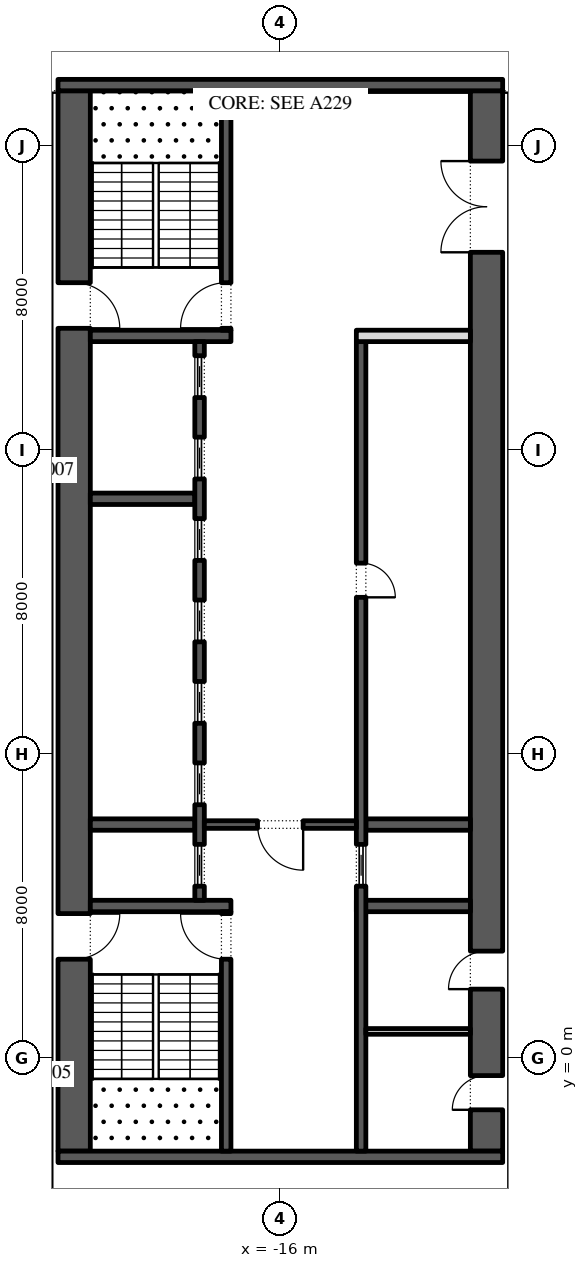
"""IFC4 building model, lengths in metres.
Left out: names, types, materials, properties, quantities, classifications, styles, units other than length and angle.
Written with IfcOpenShell. Run it as: python <this file> out.ifc"""

import sys

from ifc_helpers import new_model, si_unit, direction, frame, frame_2d, origin, place, context, subcontext, project, spatial, rectangle, extrude, element, fill, save


model = new_model("IFC4")
c1 = context("Model", 3, precision=1e-05, world=origin(), true_north=direction((0.0, 1.0)))
c2 = subcontext(c1, "Body", "Model", "MODEL_VIEW")
j1 = project(units=[si_unit("LENGTHUNIT", "METRE"), si_unit("PLANEANGLEUNIT", "RADIAN")], contexts=[c1])
p1 = place(None, origin())
s1 = spatial("IfcSite", under=j1, at=p1, CompositionType="ELEMENT")
p2 = place(p1, origin())
s2 = spatial("IfcBuilding", under=s1, at=p2, CompositionType="ELEMENT")
p3 = place(p2, frame((0.0, 0.0, 122.4)))
s3 = spatial("IfcBuildingStorey", under=s2, at=p3, CompositionType="ELEMENT", Elevation=122.4)
p4 = place(p3, frame((-21.425, -2.45, 0.0), z_axis=(0.0, 0.0, 1.0), x_axis=(0.0, 1.0, 0.0)))
e1 = element("IfcWall", 1, at=p4, inside=s3, PredefinedType="SHEAR", context=c2, shape_type="SweptSolid", body=[
    extrude(rectangle(XDim=27.9, YDim=0.85, at=frame_2d((13.95, 0.0))), origin(), (0.0, 0.0, 1.0), 4.0),
])
p5 = place(p4, frame((5.05, 0.0, 0.0)))
e2 = element("IfcOpeningElement", 2, at=p5, cuts=e1, PredefinedType="OPENING", context=c2, shape_type="SweptSolid", body=[
    extrude(rectangle(XDim=1.2, YDim=2.1, at=frame_2d((0.6, 1.05))), frame((0.0, 0.435, 0.0), z_axis=(0.0, -1.0, 0.0), x_axis=(1.0, 0.0, 0.0)), (0.0, 0.0, 1.0), 0.87),
])
p6 = place(p4, frame((21.65, 0.0, 0.0)))
e3 = element("IfcOpeningElement", 3, at=p6, cuts=e1, PredefinedType="OPENING", context=c2, shape_type="SweptSolid", body=[
    extrude(rectangle(XDim=1.2, YDim=2.1, at=frame_2d((0.6, 1.05))), frame((0.0, 0.435, 0.0), z_axis=(0.0, -1.0, 0.0), x_axis=(1.0, 0.0, 0.0)), (0.0, 0.0, 1.0), 0.87),
])
p7 = place(p3, frame((-10.575, -2.45, 0.0), z_axis=(0.0, 0.0, 1.0), x_axis=(0.0, 1.0, 0.0)))
e4 = element("IfcWall", 4, at=p7, inside=s3, PredefinedType="SHEAR", context=c2, shape_type="SweptSolid", body=[
    extrude(rectangle(XDim=27.9, YDim=0.85, at=frame_2d((13.95, 0.0))), origin(), (0.0, 0.0, 1.0), 4.0),
])
p8 = place(p7, frame((23.65, 0.0, 0.0)))
e5 = element("IfcOpeningElement", 5, at=p8, cuts=e4, PredefinedType="OPENING", context=c2, shape_type="SweptSolid", body=[
    extrude(rectangle(XDim=2.4, YDim=2.1, at=frame_2d((1.2, 1.05))), frame((0.0, 0.435, 0.0), z_axis=(0.0, -1.0, 0.0), x_axis=(1.0, 0.0, 0.0)), (0.0, 0.0, 1.0), 0.87),
])
p9 = place(p7, frame((1.087, 0.0, 0.0)))
e6 = element("IfcOpeningElement", 6, at=p9, cuts=e4, PredefinedType="OPENING", context=c2, shape_type="SweptSolid", body=[
    extrude(rectangle(XDim=0.9, YDim=2.1, at=frame_2d((0.45, 1.05))), frame((0.0, 0.435, 0.0), z_axis=(0.0, -1.0, 0.0), x_axis=(1.0, 0.0, 0.0)), (0.0, 0.0, 1.0), 0.87),
])
p10 = place(p7, frame((4.262, 0.0, 0.0)))
e7 = element("IfcOpeningElement", 7, at=p10, cuts=e4, PredefinedType="OPENING", context=c2, shape_type="SweptSolid", body=[
    extrude(rectangle(XDim=1.0, YDim=2.1, at=frame_2d((0.5, 1.05))), frame((0.0, 0.435, 0.0), z_axis=(0.0, -1.0, 0.0), x_axis=(1.0, 0.0, 0.0)), (0.0, 0.0, 1.0), 0.87),
])
for number, where, z_axis, x_axis in (
    (8, (-21.85, -2.6, 0.0), (0.0, 0.0, 1.0), (1.0, 0.0, 0.0)),
    (9, (-21.85, 25.6, 0.0), (0.0, 0.0, 1.0), (1.0, 0.0, 0.0)),
):
    element("IfcWall", number, at=place(p3, frame(where, z_axis=z_axis, x_axis=x_axis)), inside=s3, PredefinedType="SHEAR", context=c2, shape_type="SweptSolid", body=[
        extrude(rectangle(XDim=11.7, YDim=0.3, at=frame_2d((5.85, 0.0))), origin(), (0.0, 0.0, 1.0), 4.0),
    ])
p11 = place(p3, frame((-21.0, 4.0, 0.0), z_axis=(0.0, 0.0, 1.0), x_axis=(1.0, 0.0, 0.0)))
e10 = element("IfcWall", 10, at=p11, inside=s3, PredefinedType="SHEAR", context=c2, shape_type="SweptSolid", body=[
    extrude(rectangle(XDim=3.7, YDim=0.3, at=frame_2d((1.85, 0.0))), origin(), (0.0, 0.0, 1.0), 4.0),
])
p12 = place(p3, frame((-17.425, -2.45, 0.0), z_axis=(0.0, 0.0, 1.0), x_axis=(0.0, 1.0, 0.0)))
e11 = element("IfcWall", 11, at=p12, inside=s3, PredefinedType="SHEAR", context=c2, shape_type="SweptSolid", body=[
    extrude(rectangle(XDim=6.3, YDim=0.25, at=frame_2d((3.15, 0.0))), origin(), (0.0, 0.0, 1.0), 4.0),
])
p13 = place(p12, frame((5.05, 0.0, 0.0)))
e12 = element("IfcOpeningElement", 12, at=p13, cuts=e11, PredefinedType="OPENING", context=c2, shape_type="SweptSolid", body=[
    extrude(rectangle(XDim=1.2, YDim=2.1, at=frame_2d((0.6, 1.05))), frame((0.0, 0.135, 0.0), z_axis=(0.0, -1.0, 0.0), x_axis=(1.0, 0.0, 0.0)), (0.0, 0.0, 1.0), 0.27),
])
p14 = place(p3, frame((-21.0, 19.0, 0.0), z_axis=(0.0, 0.0, 1.0), x_axis=(1.0, 0.0, 0.0)))
e13 = element("IfcWall", 13, at=p14, inside=s3, PredefinedType="SHEAR", context=c2, shape_type="SweptSolid", body=[
    extrude(rectangle(XDim=3.7, YDim=0.3, at=frame_2d((1.85, 0.0))), origin(), (0.0, 0.0, 1.0), 4.0),
])
p15 = place(p3, frame((-17.425, 19.15, 0.0), z_axis=(0.0, 0.0, 1.0), x_axis=(0.0, 1.0, 0.0)))
e14 = element("IfcWall", 14, at=p15, inside=s3, PredefinedType="SHEAR", context=c2, shape_type="SweptSolid", body=[
    extrude(rectangle(XDim=6.3, YDim=0.25, at=frame_2d((3.15, 0.0))), origin(), (0.0, 0.0, 1.0), 4.0),
])
p16 = place(p15, frame((0.05, 0.0, 0.0)))
e15 = element("IfcOpeningElement", 15, at=p16, cuts=e14, PredefinedType="OPENING", context=c2, shape_type="SweptSolid", body=[
    extrude(rectangle(XDim=1.2, YDim=2.1, at=frame_2d((0.6, 1.05))), frame((0.0, 0.135, 0.0), z_axis=(0.0, -1.0, 0.0), x_axis=(1.0, 0.0, 0.0)), (0.0, 0.0, 1.0), 0.27),
])
for number, where, z_axis, x_axis in (
    (16, (-21.0, 6.143, 0.0), (0.0, 0.0, 1.0), (1.0, 0.0, 0.0)),
    (17, (-21.0, 14.714, 0.0), (0.0, 0.0, 1.0), (1.0, 0.0, 0.0)),
):
    element("IfcWall", number, at=place(p3, frame(where, z_axis=z_axis, x_axis=x_axis)), inside=s3, PredefinedType="SHEAR", context=c2, shape_type="SweptSolid", body=[
        extrude(rectangle(XDim=2.75, YDim=0.3, at=frame_2d((1.375, 0.0))), origin(), (0.0, 0.0, 1.0), 4.0),
    ])
p17 = place(p3, frame((-18.125, 4.15, 0.0), z_axis=(0.0, 0.0, 1.0), x_axis=(0.0, 1.0, 0.0)))
e18 = element("IfcWall", 18, at=p17, inside=s3, PredefinedType="SHEAR", context=c2, shape_type="SweptSolid", body=[
    extrude(rectangle(XDim=14.7, YDim=0.25, at=frame_2d((7.35, 0.0))), origin(), (0.0, 0.0, 1.0), 4.0),
])
p18 = place(p17, frame((0.371, 0.0, 0.0)))
e19 = element("IfcOpeningElement", 19, at=p18, cuts=e18, PredefinedType="OPENING", context=c2, shape_type="SweptSolid", body=[
    extrude(rectangle(XDim=1.1, YDim=2.1, at=frame_2d((0.55, 1.05))), frame((0.0, 0.135, 0.0), z_axis=(0.0, -1.0, 0.0), x_axis=(1.0, 0.0, 0.0)), (0.0, 0.0, 1.0), 0.27),
])
p19 = place(p17, frame((2.514, 0.0, 0.0)))
e20 = element("IfcOpeningElement", 20, at=p19, cuts=e18, PredefinedType="OPENING", context=c2, shape_type="SweptSolid", body=[
    extrude(rectangle(XDim=1.1, YDim=2.1, at=frame_2d((0.55, 1.05))), frame((0.0, 0.135, 0.0), z_axis=(0.0, -1.0, 0.0), x_axis=(1.0, 0.0, 0.0)), (0.0, 0.0, 1.0), 0.27),
])
p20 = place(p17, frame((4.657, 0.0, 0.0)))
e21 = element("IfcOpeningElement", 21, at=p20, cuts=e18, PredefinedType="OPENING", context=c2, shape_type="SweptSolid", body=[
    extrude(rectangle(XDim=1.1, YDim=2.1, at=frame_2d((0.55, 1.05))), frame((0.0, 0.135, 0.0), z_axis=(0.0, -1.0, 0.0), x_axis=(1.0, 0.0, 0.0)), (0.0, 0.0, 1.0), 0.27),
])
p21 = place(p17, frame((6.8, 0.0, 0.0)))
e22 = element("IfcOpeningElement", 22, at=p21, cuts=e18, PredefinedType="OPENING", context=c2, shape_type="SweptSolid", body=[
    extrude(rectangle(XDim=1.1, YDim=2.1, at=frame_2d((0.55, 1.05))), frame((0.0, 0.135, 0.0), z_axis=(0.0, -1.0, 0.0), x_axis=(1.0, 0.0, 0.0)), (0.0, 0.0, 1.0), 0.27),
])
p22 = place(p17, frame((8.943, 0.0, 0.0)))
e23 = element("IfcOpeningElement", 23, at=p22, cuts=e18, PredefinedType="OPENING", context=c2, shape_type="SweptSolid", body=[
    extrude(rectangle(XDim=1.1, YDim=2.1, at=frame_2d((0.55, 1.05))), frame((0.0, 0.135, 0.0), z_axis=(0.0, -1.0, 0.0), x_axis=(1.0, 0.0, 0.0)), (0.0, 0.0, 1.0), 0.27),
])
p23 = place(p17, frame((11.086, 0.0, 0.0)))
e24 = element("IfcOpeningElement", 24, at=p23, cuts=e18, PredefinedType="OPENING", context=c2, shape_type="SweptSolid", body=[
    extrude(rectangle(XDim=1.1, YDim=2.1, at=frame_2d((0.55, 1.05))), frame((0.0, 0.135, 0.0), z_axis=(0.0, -1.0, 0.0), x_axis=(1.0, 0.0, 0.0)), (0.0, 0.0, 1.0), 0.27),
])
p24 = place(p17, frame((13.229, 0.0, 0.0)))
e25 = element("IfcOpeningElement", 25, at=p24, cuts=e18, PredefinedType="OPENING", context=c2, shape_type="SweptSolid", body=[
    extrude(rectangle(XDim=1.1, YDim=2.1, at=frame_2d((0.55, 1.05))), frame((0.0, 0.135, 0.0), z_axis=(0.0, -1.0, 0.0), x_axis=(1.0, 0.0, 0.0)), (0.0, 0.0, 1.0), 0.27),
])
p25 = place(p3, frame((-14.0, 4.0, 0.0), z_axis=(0.0, 0.0, 1.0), x_axis=(1.0, 0.0, 0.0)))
e26 = element("IfcWall", 26, at=p25, inside=s3, PredefinedType="SHEAR", context=c2, shape_type="SweptSolid", body=[
    extrude(rectangle(XDim=3.0, YDim=0.3, at=frame_2d((1.5, 0.0))), origin(), (0.0, 0.0, 1.0), 4.0),
])
p26 = place(p3, frame((-13.75, 6.143, 0.0), z_axis=(0.0, 0.0, 1.0), x_axis=(1.0, 0.0, 0.0)))
e27 = element("IfcWall", 27, at=p26, inside=s3, PredefinedType="SHEAR", context=c2, shape_type="SweptSolid", body=[
    extrude(rectangle(XDim=2.75, YDim=0.3, at=frame_2d((1.375, 0.0))), origin(), (0.0, 0.0, 1.0), 4.0),
])
p27 = place(p3, frame((-13.875, -2.45, 0.0), z_axis=(0.0, 0.0, 1.0), x_axis=(0.0, 1.0, 0.0)))
e28 = element("IfcWall", 28, at=p27, inside=s3, PredefinedType="SHEAR", context=c2, shape_type="SweptSolid", body=[
    extrude(rectangle(XDim=21.3, YDim=0.25, at=frame_2d((10.65, 0.0))), origin(), (0.0, 0.0, 1.0), 4.0),
])
p28 = place(p27, frame((14.571, 0.0, 0.0)))
e29 = element("IfcOpeningElement", 29, at=p28, cuts=e28, PredefinedType="OPENING", context=c2, shape_type="SweptSolid", body=[
    extrude(rectangle(XDim=0.9, YDim=2.1, at=frame_2d((0.45, 1.05))), frame((0.0, 0.135, 0.0), z_axis=(0.0, -1.0, 0.0), x_axis=(1.0, 0.0, 0.0)), (0.0, 0.0, 1.0), 0.27),
])
p29 = place(p27, frame((6.971, 0.0, 0.0)))
e30 = element("IfcOpeningElement", 30, at=p29, cuts=e28, PredefinedType="OPENING", context=c2, shape_type="SweptSolid", body=[
    extrude(rectangle(XDim=1.1, YDim=2.1, at=frame_2d((0.55, 1.05))), frame((0.0, 0.135, 0.0), z_axis=(0.0, -1.0, 0.0), x_axis=(1.0, 0.0, 0.0)), (0.0, 0.0, 1.0), 0.27),
])
p30 = place(p3, frame((-14.0, 19.0, 0.0), z_axis=(0.0, 0.0, 1.0), x_axis=(1.0, 0.0, 0.0)))
e31 = element("IfcWall", 31, at=p30, inside=s3, PredefinedType="PARTITIONING", context=c2, shape_type="SweptSolid", body=[
    extrude(rectangle(XDim=3.0, YDim=0.3, at=frame_2d((1.5, 0.0))), origin(), (0.0, 0.0, 1.0), 4.0),
])
p31 = place(p3, frame((-18.0, 6.143, 0.0), z_axis=(0.0, 0.0, 1.0), x_axis=(1.0, 0.0, 0.0)))
e32 = element("IfcWall", 32, at=p31, inside=s3, PredefinedType="SHEAR", context=c2, shape_type="SweptSolid", body=[
    extrude(rectangle(XDim=4.0, YDim=0.2, at=frame_2d((2.0, 0.0))), origin(), (0.0, 0.0, 1.0), 4.0),
])
p32 = place(p31, frame((1.4, 0.0, 0.0)))
e33 = element("IfcOpeningElement", 33, at=p32, cuts=e32, PredefinedType="OPENING", context=c2, shape_type="SweptSolid", body=[
    extrude(rectangle(XDim=1.2, YDim=2.1, at=frame_2d((0.6, 1.05))), frame((0.0, 0.11, 0.0), z_axis=(0.0, -1.0, 0.0), x_axis=(1.0, 0.0, 0.0)), (0.0, 0.0, 1.0), 0.22),
])
p33 = place(p3, frame((-13.75, 0.7, 0.0), z_axis=(0.0, 0.0, 1.0), x_axis=(1.0, 0.0, 0.0)))
e34 = element("IfcWall", 34, at=p33, inside=s3, PredefinedType="PARTITIONING", context=c2, shape_type="SweptSolid", body=[
    extrude(rectangle(XDim=2.75, YDim=0.15, at=frame_2d((1.375, 0.0))), origin(), (0.0, 0.0, 1.0), 4.0),
])
p34 = place(p18, origin())
e35 = element("IfcDoor", 35, at=p34, inside=s3, OperationType="SLIDING_TO_LEFT", PredefinedType="DOOR", context=c2, shape_type="SweptSolid", body=[
    extrude(rectangle(XDim=1.1, YDim=2.1, at=frame_2d((0.55, 1.05))), frame((0.0, 0.025, 0.0), z_axis=(0.0, -1.0, 0.0), x_axis=(1.0, 0.0, 0.0)), (0.0, 0.0, 1.0), 0.05),
])
fill(e19, e35)
p35 = place(p19, origin())
e36 = element("IfcDoor", 36, at=p35, inside=s3, OperationType="SLIDING_TO_LEFT", PredefinedType="DOOR", context=c2, shape_type="SweptSolid", body=[
    extrude(rectangle(XDim=1.1, YDim=2.1, at=frame_2d((0.55, 1.05))), frame((0.0, 0.025, 0.0), z_axis=(0.0, -1.0, 0.0), x_axis=(1.0, 0.0, 0.0)), (0.0, 0.0, 1.0), 0.05),
])
fill(e20, e36)
p36 = place(p20, origin())
e37 = element("IfcDoor", 37, at=p36, inside=s3, OperationType="SLIDING_TO_LEFT", PredefinedType="DOOR", context=c2, shape_type="SweptSolid", body=[
    extrude(rectangle(XDim=1.1, YDim=2.1, at=frame_2d((0.55, 1.05))), frame((0.0, 0.025, 0.0), z_axis=(0.0, -1.0, 0.0), x_axis=(1.0, 0.0, 0.0)), (0.0, 0.0, 1.0), 0.05),
])
fill(e21, e37)
p37 = place(p21, origin())
e38 = element("IfcDoor", 38, at=p37, inside=s3, OperationType="SLIDING_TO_LEFT", PredefinedType="DOOR", context=c2, shape_type="SweptSolid", body=[
    extrude(rectangle(XDim=1.1, YDim=2.1, at=frame_2d((0.55, 1.05))), frame((0.0, 0.025, 0.0), z_axis=(0.0, -1.0, 0.0), x_axis=(1.0, 0.0, 0.0)), (0.0, 0.0, 1.0), 0.05),
])
fill(e22, e38)
p38 = place(p22, origin())
e39 = element("IfcDoor", 39, at=p38, inside=s3, OperationType="SLIDING_TO_LEFT", PredefinedType="DOOR", context=c2, shape_type="SweptSolid", body=[
    extrude(rectangle(XDim=1.1, YDim=2.1, at=frame_2d((0.55, 1.05))), frame((0.0, 0.025, 0.0), z_axis=(0.0, -1.0, 0.0), x_axis=(1.0, 0.0, 0.0)), (0.0, 0.0, 1.0), 0.05),
])
fill(e23, e39)
p39 = place(p23, origin())
e40 = element("IfcDoor", 40, at=p39, inside=s3, OperationType="SLIDING_TO_LEFT", PredefinedType="DOOR", context=c2, shape_type="SweptSolid", body=[
    extrude(rectangle(XDim=1.1, YDim=2.1, at=frame_2d((0.55, 1.05))), frame((0.0, 0.025, 0.0), z_axis=(0.0, -1.0, 0.0), x_axis=(1.0, 0.0, 0.0)), (0.0, 0.0, 1.0), 0.05),
])
fill(e24, e40)
p40 = place(p24, origin())
e41 = element("IfcDoor", 41, at=p40, inside=s3, OperationType="SLIDING_TO_LEFT", PredefinedType="DOOR", context=c2, shape_type="SweptSolid", body=[
    extrude(rectangle(XDim=1.1, YDim=2.1, at=frame_2d((0.55, 1.05))), frame((0.0, 0.025, 0.0), z_axis=(0.0, -1.0, 0.0), x_axis=(1.0, 0.0, 0.0)), (0.0, 0.0, 1.0), 0.05),
])
fill(e25, e41)
p41 = place(p28, frame((0.9, -0.2, 0.0), z_axis=(0.0, 0.0, 1.0), x_axis=(-1.0, 0.0, 0.0)))
e42 = element("IfcDoor", 42, at=p41, inside=s3, OperationType="SINGLE_SWING_LEFT", PredefinedType="DOOR", context=c2, shape_type="SweptSolid", body=[
    extrude(rectangle(XDim=0.9, YDim=2.1, at=frame_2d((0.45, 1.05))), frame((0.0, -0.075, 0.0), z_axis=(0.0, -1.0, 0.0), x_axis=(1.0, 0.0, 0.0)), (0.0, 0.0, 1.0), 0.05),
])
fill(e29, e42)
p42 = place(p29, origin())
e43 = element("IfcDoor", 43, at=p42, inside=s3, OperationType="SLIDING_TO_LEFT", PredefinedType="DOOR", context=c2, shape_type="SweptSolid", body=[
    extrude(rectangle(XDim=1.1, YDim=2.1, at=frame_2d((0.55, 1.05))), frame((0.0, 0.025, 0.0), z_axis=(0.0, -1.0, 0.0), x_axis=(1.0, 0.0, 0.0)), (0.0, 0.0, 1.0), 0.05),
])
fill(e30, e43)
p43 = place(p32, frame((1.2, 0.0, 0.0), z_axis=(0.0, 0.0, 1.0), x_axis=(-1.0, 0.0, 0.0)))
e44 = element("IfcDoor", 44, at=p43, inside=s3, OperationType="SINGLE_SWING_RIGHT", PredefinedType="DOOR", context=c2, shape_type="SweptSolid", body=[
    extrude(rectangle(XDim=1.2, YDim=2.1, at=frame_2d((0.6, 1.05))), frame((0.0, 0.025, 0.0), z_axis=(0.0, -1.0, 0.0), x_axis=(1.0, 0.0, 0.0)), (0.0, 0.0, 1.0), 0.05),
])
fill(e33, e44)
p44 = place(p8, origin())
e45 = element("IfcDoor", 45, at=p44, inside=s3, OperationType="DOUBLE_DOOR_SINGLE_SWING", PredefinedType="DOOR", context=c2, shape_type="SweptSolid", body=[
    extrude(rectangle(XDim=2.4, YDim=2.1, at=frame_2d((1.2, 1.05))), frame((0.0, 0.025, 0.0), z_axis=(0.0, -1.0, 0.0), x_axis=(1.0, 0.0, 0.0)), (0.0, 0.0, 1.0), 0.05),
])
fill(e5, e45)
p45 = place(p13, origin())
e46 = element("IfcDoor", 46, at=p45, inside=s3, OperationType="SINGLE_SWING_LEFT", PredefinedType="DOOR", context=c2, shape_type="SweptSolid", body=[
    extrude(rectangle(XDim=1.2, YDim=2.1, at=frame_2d((0.6, 1.05))), frame((0.0, 0.025, 0.0), z_axis=(0.0, -1.0, 0.0), x_axis=(1.0, 0.0, 0.0)), (0.0, 0.0, 1.0), 0.05),
])
fill(e12, e46)
p46 = place(p5, frame((1.2, 0.0, 0.0), z_axis=(0.0, 0.0, 1.0), x_axis=(-1.0, 0.0, 0.0)))
e47 = element("IfcDoor", 47, at=p46, inside=s3, OperationType="SINGLE_SWING_RIGHT", PredefinedType="DOOR", context=c2, shape_type="SweptSolid", body=[
    extrude(rectangle(XDim=1.2, YDim=2.1, at=frame_2d((0.6, 1.05))), frame((0.0, 0.025, 0.0), z_axis=(0.0, -1.0, 0.0), x_axis=(1.0, 0.0, 0.0)), (0.0, 0.0, 1.0), 0.05),
])
fill(e2, e47)
p47 = place(p16, origin())
e48 = element("IfcDoor", 48, at=p47, inside=s3, OperationType="SINGLE_SWING_RIGHT", PredefinedType="DOOR", context=c2, shape_type="SweptSolid", body=[
    extrude(rectangle(XDim=1.2, YDim=2.1, at=frame_2d((0.6, 1.05))), frame((0.0, 0.025, 0.0), z_axis=(0.0, -1.0, 0.0), x_axis=(1.0, 0.0, 0.0)), (0.0, 0.0, 1.0), 0.05),
])
fill(e15, e48)
p48 = place(p6, frame((1.2, 0.0, 0.0), z_axis=(0.0, 0.0, 1.0), x_axis=(-1.0, 0.0, 0.0)))
e49 = element("IfcDoor", 49, at=p48, inside=s3, OperationType="SINGLE_SWING_LEFT", PredefinedType="DOOR", context=c2, shape_type="SweptSolid", body=[
    extrude(rectangle(XDim=1.2, YDim=2.1, at=frame_2d((0.6, 1.05))), frame((0.0, 0.025, 0.0), z_axis=(0.0, -1.0, 0.0), x_axis=(1.0, 0.0, 0.0)), (0.0, 0.0, 1.0), 0.05),
])
fill(e3, e49)
p49 = place(p9, origin())
e50 = element("IfcDoor", 50, at=p49, inside=s3, OperationType="SINGLE_SWING_RIGHT", PredefinedType="DOOR", context=c2, shape_type="SweptSolid", body=[
    extrude(rectangle(XDim=0.9, YDim=2.1, at=frame_2d((0.45, 1.05))), frame((0.0, 0.425, 0.0), z_axis=(0.0, -1.0, 0.0), x_axis=(1.0, 0.0, 0.0)), (0.0, 0.0, 1.0), 0.05),
])
fill(e6, e50)
p50 = place(p10, origin())
e51 = element("IfcDoor", 51, at=p50, inside=s3, OperationType="SINGLE_SWING_RIGHT", PredefinedType="DOOR", context=c2, shape_type="SweptSolid", body=[
    extrude(rectangle(XDim=1.0, YDim=2.1, at=frame_2d((0.5, 1.05))), frame((0.0, 0.425, 0.0), z_axis=(0.0, -1.0, 0.0), x_axis=(1.0, 0.0, 0.0)), (0.0, 0.0, 1.0), 0.05),
])
fill(e7, e51)
save(model, sys.argv[1])
